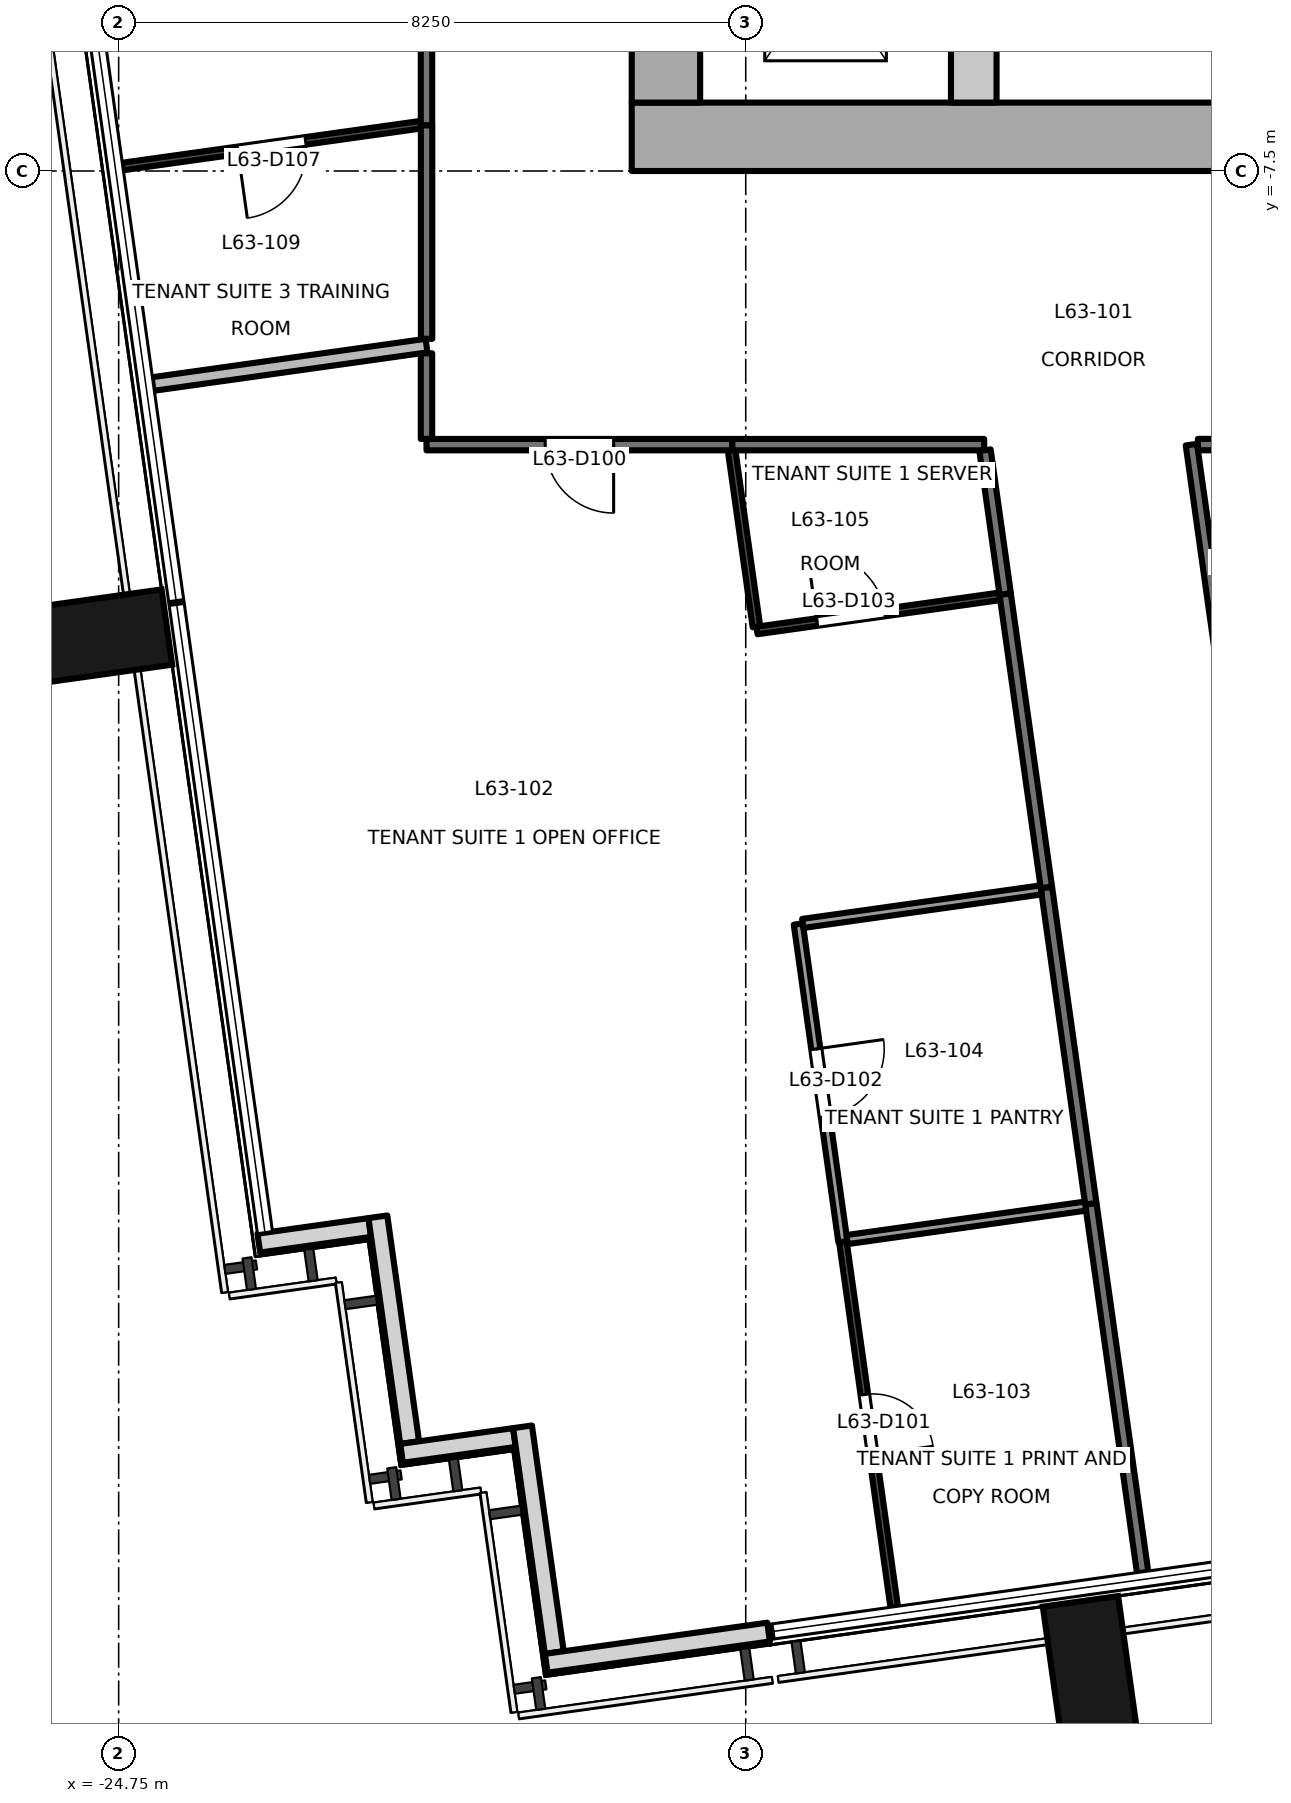
"""IFC4 building model, lengths in metres.
Left out: names, types, materials, properties, quantities, classifications, styles, units other than length and angle.
Written with IfcOpenShell. Run it as: python <this file> out.ifc"""

import sys

from ifc_helpers import new_model, si_unit, direction, frame, frame_2d, origin, origin_2d, place, context, subcontext, project, spatial, rectangle, extrude, element, fill, save


model = new_model("IFC4")
c1 = context("Model", 3, precision=1e-05, world=origin(), true_north=direction((0.0, 1.0)))
c2 = subcontext(c1, "Body", "Model", "MODEL_VIEW")
j1 = project(units=[si_unit("LENGTHUNIT", "METRE"), si_unit("PLANEANGLEUNIT", "RADIAN")], contexts=[c1])
p1 = place(None, origin())
s1 = spatial("IfcSite", under=j1, at=p1, CompositionType="ELEMENT")
p2 = place(p1, origin())
s2 = spatial("IfcBuilding", under=s1, at=p2, CompositionType="ELEMENT")
p3 = place(p2, frame((0.0, 0.0, 274.6)))
s3 = spatial("IfcBuildingStorey", under=s2, at=p3, CompositionType="ELEMENT", Elevation=274.6)
for number, where, z_axis, x_axis in (
    (1, (-11.971, -27.209, -0.2), (0.0, 0.0, 1.0), (0.99, 0.139, 0.0)),
    (2, (-25.007, -13.625, -0.2), (0.0, 0.0, 1.0), (-0.139, 0.99, 0.0)),
):
    element("IfcColumn", number, at=place(p3, frame(where, z_axis=z_axis, x_axis=x_axis)), inside=s3, PredefinedType="COLUMN", context=c2, shape_type="SweptSolid", body=[
        extrude(rectangle(XDim=1.0, YDim=1.8, at=origin_2d()), origin(), (0.0, 0.0, 1.0), 3.9),
    ])
p4 = place(p3, frame((-22.906, -21.605, 0.0), z_axis=(0.0, 0.0, 1.0), x_axis=(0.990235520307, 0.13940449893, 0.0)))
e3 = element("IfcWall", 3, at=p4, inside=s3, PredefinedType="SOLIDWALL", context=c2, shape_type="SweptSolid", body=[
    extrude(rectangle(XDim=1.475, YDim=0.25, at=frame_2d((0.737, 0.0))), origin(), (0.0, 0.0, 1.0), 3.7),
])
p5 = place(p3, frame((-21.34, -21.258, 0.0), z_axis=(0.0, 0.0, 1.0), x_axis=(0.139393225799, -0.990237107263, 0.0)))
e4 = element("IfcWall", 4, at=p5, inside=s3, PredefinedType="SOLIDWALL", context=c2, shape_type="SweptSolid", body=[
    extrude(rectangle(XDim=3.0, YDim=0.25, at=frame_2d((1.5, 0.0))), origin(), (0.0, 0.0, 1.0), 3.7),
])
p6 = place(p3, frame((-21.028, -24.37, 0.0), z_axis=(0.0, 0.0, 1.0), x_axis=(0.990330117064, 0.138730887823, 0.0)))
e5 = element("IfcWall", 5, at=p6, inside=s3, PredefinedType="SOLIDWALL", context=c2, shape_type="SweptSolid", body=[
    extrude(rectangle(XDim=1.499, YDim=0.25, at=frame_2d((0.75, 0.0))), origin(), (0.0, 0.0, 1.0), 3.7),
])
p7 = place(p3, frame((-19.437, -24.021, 0.0), z_axis=(0.0, 0.0, 1.0), x_axis=(0.139358350296, -0.990242015975, 0.0)))
e6 = element("IfcWall", 6, at=p7, inside=s3, PredefinedType="SOLIDWALL", context=c2, shape_type="SweptSolid", body=[
    extrude(rectangle(XDim=2.999, YDim=0.25, at=frame_2d((1.5, 0.0))), origin(), (0.0, 0.0, 1.0), 3.7),
])
p8 = place(p3, frame((-19.125, -27.132, 0.0), z_axis=(0.0, 0.0, 1.0), x_axis=(0.990291981483, 0.139002846771, 0.0)))
e7 = element("IfcWall", 7, at=p8, inside=s3, PredefinedType="SOLIDWALL", context=c2, shape_type="SweptSolid", body=[
    extrude(rectangle(XDim=2.954, YDim=0.25, at=frame_2d((1.477, 0.0))), origin(), (0.0, 0.0, 1.0), 3.7),
])
p9 = place(p3, frame((-18.0, -7.05, -0.2), z_axis=(0.0, 0.0, 1.0), x_axis=(1.0, 0.0, 0.0)))
e8 = element("IfcWall", 8, at=p9, inside=s3, PredefinedType="SHEAR", context=c2, shape_type="SweptSolid", body=[
    extrude(rectangle(XDim=36.0, YDim=0.9, at=frame_2d((18.0, 0.0))), origin(), (0.0, 0.0, 1.0), 3.9),
])
p10 = place(p9, frame((11.3, 0.0, 0.2)))
e9 = element("IfcOpeningElement", 9, at=p10, cuts=e8, PredefinedType="OPENING", context=c2, shape_type="SweptSolid", body=[
    extrude(rectangle(XDim=1.8, YDim=2.1, at=frame_2d((0.9, 1.05))), frame((0.0, 0.46, 0.0), z_axis=(0.0, -1.0, 0.0), x_axis=(1.0, 0.0, 0.0)), (0.0, 0.0, 1.0), 0.921),
])
p11 = place(p9, frame((16.8, 0.0, 0.2)))
e10 = element("IfcOpeningElement", 10, at=p11, cuts=e8, PredefinedType="OPENING", context=c2, shape_type="SweptSolid", body=[
    extrude(rectangle(XDim=2.4, YDim=2.1, at=frame_2d((1.2, 1.05))), frame((0.0, 0.46, 0.0), z_axis=(0.0, -1.0, 0.0), x_axis=(1.0, 0.0, 0.0)), (0.0, 0.0, 1.0), 0.921),
])
p12 = place(p9, frame((26.1, 0.0, 0.2)))
e11 = element("IfcOpeningElement", 11, at=p12, cuts=e8, PredefinedType="OPENING", context=c2, shape_type="SweptSolid", body=[
    extrude(rectangle(XDim=2.4, YDim=2.1, at=frame_2d((1.2, 1.05))), frame((0.0, 0.46, 0.0), z_axis=(0.0, -1.0, 0.0), x_axis=(1.0, 0.0, 0.0)), (0.0, 0.0, 1.0), 0.921),
])
p13 = place(p3, frame((-17.55, -6.6, -0.2), z_axis=(0.0, 0.0, 1.0), x_axis=(0.0, 1.0, 0.0)))
e12 = element("IfcWall", 12, at=p13, inside=s3, PredefinedType="SHEAR", context=c2, shape_type="SweptSolid", body=[
    extrude(rectangle(XDim=13.2, YDim=0.9, at=frame_2d((6.6, 0.0))), origin(), (0.0, 0.0, 1.0), 3.9),
])
p14 = place(p13, frame((4.55, 0.0, 0.2)))
e13 = element("IfcOpeningElement", 13, at=p14, cuts=e12, PredefinedType="OPENING", context=c2, shape_type="SweptSolid", body=[
    extrude(rectangle(XDim=1.2, YDim=2.1, at=frame_2d((0.6, 1.05))), frame((0.0, 0.46, 0.0), z_axis=(0.0, -1.0, 0.0), x_axis=(1.0, 0.0, 0.0)), (0.0, 0.0, 1.0), 0.921),
])
p15 = place(p3, frame((-13.5, -6.6, -0.2), z_axis=(0.0, 0.0, 1.0), x_axis=(0.0, 1.0, 0.0)))
e14 = element("IfcWall", 14, at=p15, inside=s3, PredefinedType="SHEAR", context=c2, shape_type="SweptSolid", body=[
    extrude(rectangle(XDim=13.2, YDim=0.6, at=frame_2d((6.6, 0.0))), origin(), (0.0, 0.0, 1.0), 3.9),
])
p16 = place(p3, frame((-20.7, -11.025, 0.0), z_axis=(0.0, 0.0, 1.0), x_axis=(0.0, 1.0, 0.0)))
e15 = element("IfcWall", 15, at=p16, inside=s3, PredefinedType="PARTITIONING", context=c2, shape_type="SweptSolid", body=[
    extrude(rectangle(XDim=1.127, YDim=0.15, at=frame_2d((0.563, 0.0))), origin(), (0.0, 0.0, 1.0), 3.7),
])
p17 = place(p3, frame((-16.676, -11.1, 0.0), z_axis=(0.0, 0.0, 1.0), x_axis=(-1.0, 0.0, 0.0)))
e16 = element("IfcWall", 16, at=p17, inside=s3, PredefinedType="PARTITIONING", context=c2, shape_type="SweptSolid", body=[
    extrude(rectangle(XDim=4.024, YDim=0.15, at=frame_2d((2.012, 0.0))), origin(), (0.0, 0.0, 1.0), 3.7),
])
p18 = place(p17, frame((1.562, 0.0, 0.0)))
e17 = element("IfcOpeningElement", 17, at=p18, cuts=e16, PredefinedType="OPENING", context=c2, shape_type="SweptSolid", body=[
    extrude(rectangle(XDim=0.9, YDim=2.1, at=frame_2d((0.45, 1.05))), frame((0.0, 0.085, 0.0), z_axis=(0.0, -1.0, 0.0), x_axis=(1.0, 0.0, 0.0)), (0.0, 0.0, 1.0), 0.171),
])
p19 = place(p3, frame((-12.544, -16.928, 0.0), z_axis=(0.0, 0.0, 1.0), x_axis=(-0.139221261089, 0.990261299083, 0.0)))
e18 = element("IfcWall", 18, at=p19, inside=s3, PredefinedType="PARTITIONING", context=c2, shape_type="SweptSolid", body=[
    extrude(rectangle(XDim=3.9, YDim=0.15, at=frame_2d((1.95, 0.0))), origin(), (0.0, 0.0, 1.0), 3.7),
])
p20 = place(p3, frame((-11.278, -25.939, 0.0), z_axis=(0.0, 0.0, 1.0), x_axis=(-0.139167797017, 0.990268814148, 0.0)))
e19 = element("IfcWall", 19, at=p20, inside=s3, PredefinedType="PARTITIONING", context=c2, shape_type="SweptSolid", body=[
    extrude(rectangle(XDim=4.9, YDim=0.15, at=frame_2d((2.45, 0.0))), origin(), (0.0, 0.0, 1.0), 3.7),
])
p21 = place(p3, frame((-11.96, -21.087, 0.0), z_axis=(0.0, 0.0, 1.0), x_axis=(-0.139052638616, 0.990284991148, 0.0)))
e20 = element("IfcWall", 20, at=p21, inside=s3, PredefinedType="PARTITIONING", context=c2, shape_type="SweptSolid", body=[
    extrude(rectangle(XDim=4.2, YDim=0.15, at=frame_2d((2.1, 0.0))), origin(), (0.0, 0.0, 1.0), 3.7),
])
p22 = place(p3, frame((-13.363, -11.1, 0.0), z_axis=(0.0, 0.0, 1.0), x_axis=(-1.0, 0.0, 0.0)))
e21 = element("IfcWall", 21, at=p22, inside=s3, PredefinedType="PARTITIONING", context=c2, shape_type="SweptSolid", body=[
    extrude(rectangle(XDim=3.313, YDim=0.15, at=frame_2d((1.656, 0.0))), origin(), (0.0, 0.0, 1.0), 2.8),
])
p23 = place(p3, frame((-13.086, -13.065, 0.0), z_axis=(0.0, 0.0, 1.0), x_axis=(-0.139292033523, 0.990251346577, 0.0)))
e22 = element("IfcWall", 22, at=p23, inside=s3, PredefinedType="PARTITIONING", context=c2, shape_type="SweptSolid", body=[
    extrude(rectangle(XDim=1.91, YDim=0.15, at=frame_2d((0.955, 0.0))), origin(), (0.0, 0.0, 1.0), 2.8),
])
p24 = place(p3, frame((-20.7, -6.9, 0.0), z_axis=(0.0, 0.0, 1.0), x_axis=(0.0, 1.0, 0.0)))
e23 = element("IfcWall", 23, at=p24, inside=s3, PredefinedType="PARTITIONING", context=c2, shape_type="SweptSolid", body=[
    extrude(rectangle(XDim=14.4, YDim=0.15, at=frame_2d((7.2, 0.0))), origin(), (0.0, 0.0, 1.0), 3.3),
])
p25 = place(p24, frame((3.275, 0.0, 0.0)))
e24 = element("IfcOpeningElement", 24, at=p25, cuts=e23, PredefinedType="OPENING", context=c2, shape_type="SweptSolid", body=[
    extrude(rectangle(XDim=1.8, YDim=2.1, at=frame_2d((0.9, 1.05))), frame((0.0, 0.085, 0.0), z_axis=(0.0, -1.0, 0.0), x_axis=(1.0, 0.0, 0.0)), (0.0, 0.0, 1.0), 0.171),
])
p26 = place(p3, frame((-20.699, -9.708, 0.0), z_axis=(0.0, 0.0, 1.0), x_axis=(0.0, 1.0, 0.0)))
e25 = element("IfcWall", 25, at=p26, inside=s3, PredefinedType="PARTITIONING", context=c2, shape_type="SweptSolid", body=[
    extrude(rectangle(XDim=2.808, YDim=0.15, at=frame_2d((1.404, 0.0))), origin(), (0.0, 0.0, 1.0), 3.7),
])
p27 = place(p3, frame((-10.637, -11.1, 0.0), z_axis=(0.0, 0.0, 1.0), x_axis=(0.139146821365, -0.990271761742, 0.0)))
e26 = element("IfcWall", 26, at=p27, inside=s3, PredefinedType="PARTITIONING", context=c2, shape_type="SweptSolid", body=[
    extrude(rectangle(XDim=4.779, YDim=0.15, at=frame_2d((2.39, 0.0))), origin(), (0.0, 0.0, 1.0), 3.7),
])
p28 = place(p3, frame((-7.627, -11.099, 0.0), z_axis=(0.0, 0.0, 1.0), x_axis=(-1.0, 0.0, 0.0)))
e27 = element("IfcWall", 27, at=p28, inside=s3, PredefinedType="PARTITIONING", context=c2, shape_type="SweptSolid", body=[
    extrude(rectangle(XDim=2.924, YDim=0.15, at=frame_2d((1.462, 0.0))), origin(), (0.0, 0.0, 1.0), 2.8),
])
p29 = place(p3, frame((-15.222, -21.586, 0.0), z_axis=(0.0, 0.0, 1.0), x_axis=(0.139120882778, -0.990275406124, 0.0)))
e28 = element("IfcWall", 28, at=p29, inside=s3, PredefinedType="PARTITIONING", context=c2, shape_type="SweptSolid", body=[
    extrude(rectangle(XDim=4.859, YDim=0.1, at=frame_2d((2.43, 0.0))), origin(), (0.0, 0.0, 1.0), 3.7),
])
p30 = place(p29, frame((2.03, 0.0, 0.0)))
e29 = element("IfcOpeningElement", 29, at=p30, cuts=e28, PredefinedType="OPENING", context=c2, shape_type="SweptSolid", body=[
    extrude(rectangle(XDim=0.8, YDim=2.1, at=frame_2d((0.4, 1.05))), frame((0.0, 0.061, 0.0), z_axis=(0.0, -1.0, 0.0), x_axis=(1.0, 0.0, 0.0)), (0.0, 0.0, 1.0), 0.121),
])
p31 = place(p3, frame((-15.809, -17.407, 0.0), z_axis=(0.0, 0.0, 1.0), x_axis=(0.139136935655, -0.99027315077, 0.0)))
e30 = element("IfcWall", 30, at=p31, inside=s3, PredefinedType="PARTITIONING", context=c2, shape_type="SweptSolid", body=[
    extrude(rectangle(XDim=4.22, YDim=0.12, at=frame_2d((2.11, 0.0))), origin(), (0.0, 0.0, 1.0), 3.7),
])
p32 = place(p31, frame((1.66, 0.0, 0.0)))
e31 = element("IfcOpeningElement", 31, at=p32, cuts=e30, PredefinedType="OPENING", context=c2, shape_type="SweptSolid", body=[
    extrude(rectangle(XDim=0.9, YDim=2.1, at=frame_2d((0.45, 1.05))), frame((0.0, 0.071, 0.0), z_axis=(0.0, -1.0, 0.0), x_axis=(1.0, 0.0, 0.0)), (0.0, 0.0, 1.0), 0.141),
])
p33 = place(p3, frame((-12.615, -16.958, 0.0), z_axis=(0.0, 0.0, 1.0), x_axis=(-0.990254086283, -0.139272555084, 0.0)))
e32 = element("IfcWall", 32, at=p33, inside=s3, PredefinedType="PARTITIONING", context=c2, shape_type="SweptSolid", body=[
    extrude(rectangle(XDim=3.166, YDim=0.12, at=frame_2d((1.583, 0.0))), origin(), (0.0, 0.0, 1.0), 2.8),
])
p34 = place(p3, frame((-16.687, -11.168, 0.0), z_axis=(0.0, 0.0, 1.0), x_axis=(0.139560302367, -0.990213573934, 0.0)))
e33 = element("IfcWall", 33, at=p34, inside=s3, PredefinedType="PARTITIONING", context=c2, shape_type="SweptSolid", body=[
    extrude(rectangle(XDim=2.351, YDim=0.1, at=frame_2d((1.176, 0.0))), origin(), (0.0, 0.0, 1.0), 3.7),
])
p35 = place(p3, frame((-16.352, -13.545, 0.0), z_axis=(0.0, 0.0, 1.0), x_axis=(0.990264894561, 0.13919568456, 0.0)))
e34 = element("IfcWall", 34, at=p35, inside=s3, PredefinedType="PARTITIONING", context=c2, shape_type="SweptSolid", body=[
    extrude(rectangle(XDim=3.226, YDim=0.1, at=frame_2d((1.613, 0.0))), origin(), (0.0, 0.0, 1.0), 2.8),
])
p36 = place(p35, frame((0.798, 0.0, 0.0)))
e35 = element("IfcOpeningElement", 35, at=p36, cuts=e34, PredefinedType="OPENING", context=c2, shape_type="SweptSolid", body=[
    extrude(rectangle(XDim=0.9, YDim=2.1, at=frame_2d((0.45, 1.05))), frame((0.0, 0.061, 0.0), z_axis=(0.0, -1.0, 0.0), x_axis=(1.0, 0.0, 0.0)), (0.0, 0.0, 1.0), 0.121),
])
p37 = place(p3, frame((-24.304, -10.303, 0.0), z_axis=(0.0, 0.0, 1.0), x_axis=(0.990292681193, 0.138997861769, 0.0)))
e36 = element("IfcWall", 36, at=p37, inside=s3, PredefinedType="PARTITIONING", context=c2, shape_type="SweptSolid", body=[
    extrude(rectangle(XDim=3.639, YDim=0.18, at=frame_2d((1.82, 0.0))), origin(), (0.0, 0.0, 1.0), 3.7),
])
p38 = place(p3, frame((-15.166, -21.558, 0.0), z_axis=(0.0, 0.0, 1.0), x_axis=(0.990285967974, 0.139045681821, 0.0)))
e37 = element("IfcWall", 37, at=p38, inside=s3, PredefinedType="PARTITIONING", context=c2, shape_type="SweptSolid", body=[
    extrude(rectangle(XDim=3.166, YDim=0.12, at=frame_2d((1.583, 0.0))), origin(), (0.0, 0.0, 1.0), 2.8),
])
p39 = place(p3, frame((-20.768, -6.89, 0.0), z_axis=(0.0, 0.0, 1.0), x_axis=(-0.990313393589, -0.138850215981, 0.0)))
e38 = element("IfcWall", 38, at=p39, inside=s3, PredefinedType="PARTITIONING", context=c2, shape_type="SweptSolid", body=[
    extrude(rectangle(XDim=3.976, YDim=0.1, at=frame_2d((1.988, 0.0))), origin(), (0.0, 0.0, 1.0), 3.7),
])
p40 = place(p39, frame((1.538, 0.0, 0.0)))
e39 = element("IfcOpeningElement", 39, at=p40, cuts=e38, PredefinedType="OPENING", context=c2, shape_type="SweptSolid", body=[
    extrude(rectangle(XDim=0.9, YDim=2.1, at=frame_2d((0.45, 1.05))), frame((0.0, 0.061, 0.0), z_axis=(0.0, -1.0, 0.0), x_axis=(1.0, 0.0, 0.0)), (0.0, 0.0, 1.0), 0.121),
])
p41 = place(p18, origin())
e40 = element("IfcDoor", 40, at=p41, inside=s3, OperationType="SINGLE_SWING_LEFT", PredefinedType="DOOR", context=c2, shape_type="SweptSolid", body=[
    extrude(rectangle(XDim=0.9, YDim=2.1, at=frame_2d((0.45, 1.05))), frame((0.0, 0.025, 0.0), z_axis=(0.0, -1.0, 0.0), x_axis=(1.0, 0.0, 0.0)), (0.0, 0.0, 1.0), 0.05),
])
fill(e17, e40)
p42 = place(p30, origin())
e41 = element("IfcDoor", 41, at=p42, inside=s3, OperationType="SINGLE_SWING_RIGHT", PredefinedType="DOOR", context=c2, shape_type="SweptSolid", body=[
    extrude(rectangle(XDim=0.8, YDim=2.1, at=frame_2d((0.4, 1.05))), frame((0.0, 0.025, 0.0), z_axis=(0.0, -1.0, 0.0), x_axis=(1.0, 0.0, 0.0)), (0.0, 0.0, 1.0), 0.05),
])
fill(e29, e41)
p43 = place(p32, origin())
e42 = element("IfcDoor", 42, at=p43, inside=s3, OperationType="SINGLE_SWING_LEFT", PredefinedType="DOOR", context=c2, shape_type="SweptSolid", body=[
    extrude(rectangle(XDim=0.9, YDim=2.1, at=frame_2d((0.45, 1.05))), frame((0.0, 0.025, 0.0), z_axis=(0.0, -1.0, 0.0), x_axis=(1.0, 0.0, 0.0)), (0.0, 0.0, 1.0), 0.05),
])
fill(e31, e42)
p44 = place(p36, origin())
e43 = element("IfcDoor", 43, at=p44, inside=s3, OperationType="SINGLE_SWING_LEFT", PredefinedType="DOOR", context=c2, shape_type="SweptSolid", body=[
    extrude(rectangle(XDim=0.9, YDim=2.1, at=frame_2d((0.45, 1.05))), frame((0.0, 0.025, 0.0), z_axis=(0.0, -1.0, 0.0), x_axis=(1.0, 0.0, 0.0)), (0.0, 0.0, 1.0), 0.05),
])
fill(e35, e43)
p45 = place(p40, origin())
e44 = element("IfcDoor", 44, at=p45, inside=s3, OperationType="SINGLE_SWING_RIGHT", PredefinedType="DOOR", context=c2, shape_type="SweptSolid", body=[
    extrude(rectangle(XDim=0.9, YDim=2.1, at=frame_2d((0.45, 1.05))), frame((0.0, 0.025, 0.0), z_axis=(0.0, -1.0, 0.0), x_axis=(1.0, 0.0, 0.0)), (0.0, 0.0, 1.0), 0.05),
])
fill(e39, e44)
save(model, sys.argv[1])
